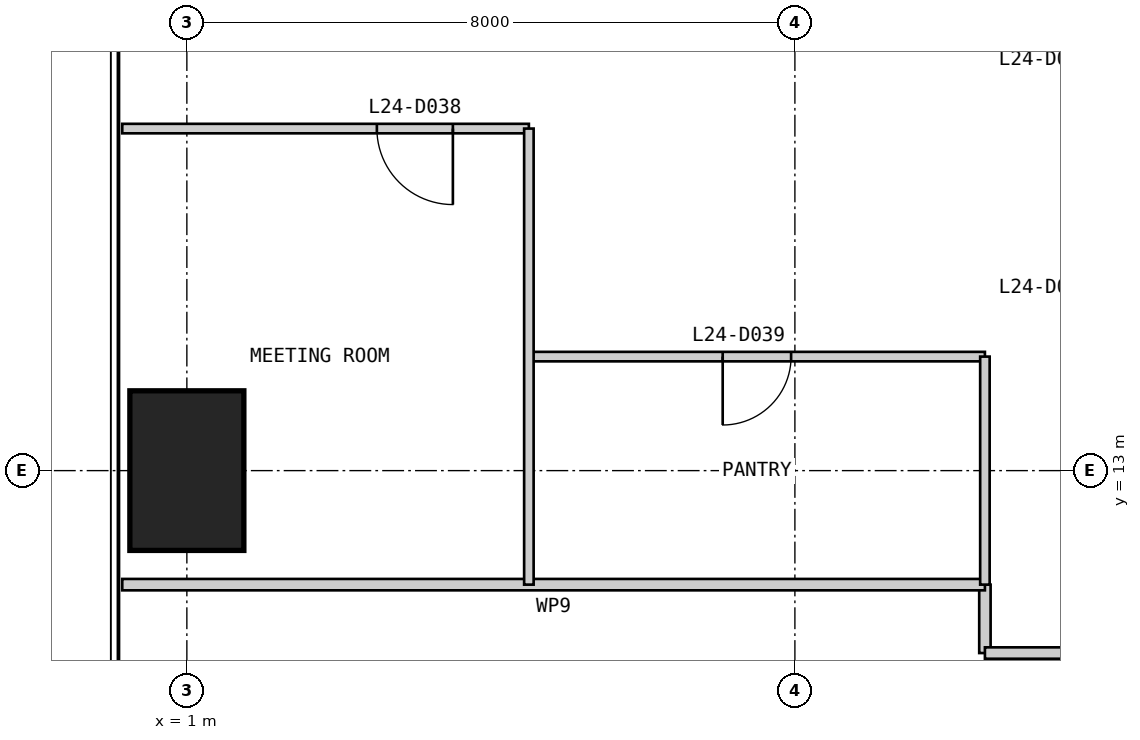
"""IFC4 building model, lengths in metres.
Left out: names, types, materials, properties, quantities, classifications, styles, units other than length and angle.
Written with IfcOpenShell. Run it as: python <this file> out.ifc"""

import sys

from ifc_helpers import new_model, si_unit, direction, frame, frame_2d, origin, origin_2d, place, context, subcontext, project, spatial, rectangle, extrude, element, fill, save


model = new_model("IFC4")
c1 = context("Model", 3, precision=1e-05, world=origin(), true_north=direction((0.0, 1.0)))
c2 = subcontext(c1, "Body", "Model", "MODEL_VIEW")
j1 = project(units=[si_unit("LENGTHUNIT", "METRE"), si_unit("PLANEANGLEUNIT", "RADIAN")], contexts=[c1])
p1 = place(None, origin())
s1 = spatial("IfcSite", under=j1, at=p1, CompositionType="ELEMENT")
p2 = place(p1, origin())
s2 = spatial("IfcBuilding", under=s1, at=p2, CompositionType="ELEMENT")
p3 = place(p2, frame((0.0, 0.0, 106.4)))
s3 = spatial("IfcBuildingStorey", under=s2, at=p3, CompositionType="ELEMENT", Elevation=106.4)
p4 = place(p3, frame((1.0, 13.0, 0.0), z_axis=(0.0, 0.0, 1.0), x_axis=(1.0, 0.0, 0.0)))
e1 = element("IfcColumn", 1, at=p4, inside=s3, PredefinedType="COLUMN", context=c2, shape_type="SweptSolid", body=[
    extrude(rectangle(XDim=1.5, YDim=2.1, at=origin_2d()), origin(), (0.0, 0.0, 1.0), 4.0),
])
p5 = place(p3, frame((11.5, 11.5, 0.0), z_axis=(0.0, 0.0, 1.0), x_axis=(0.0, -1.0, 0.0)))
e2 = element("IfcWall", 2, at=p5, inside=s3, PredefinedType="PARTITIONING", context=c2, shape_type="SweptSolid", body=[
    extrude(rectangle(XDim=0.9, YDim=0.15, at=frame_2d((0.45, 0.0))), origin(), (0.0, 0.0, 1.0), 3.85),
])
p6 = place(p3, frame((11.5, 10.6, 0.0), z_axis=(0.0, 0.0, 1.0), x_axis=(1.0, 0.0, 0.0)))
e3 = element("IfcWall", 3, at=p6, inside=s3, PredefinedType="PARTITIONING", context=c2, shape_type="SweptSolid", body=[
    extrude(rectangle(XDim=27.9, YDim=0.15, at=frame_2d((13.95, 0.0))), origin(), (0.0, 0.0, 1.0), 3.85),
])
p7 = place(p6, frame((12.25, 0.0, 0.0)))
e4 = element("IfcOpeningElement", 4, at=p7, cuts=e3, PredefinedType="OPENING", context=c2, shape_type="SweptSolid", body=[
    extrude(rectangle(XDim=1.0, YDim=2.2, at=frame_2d((0.5, 1.1))), frame((0.0, 0.085, 0.0), z_axis=(0.0, -1.0, 0.0), x_axis=(1.0, 0.0, 0.0)), (0.0, 0.0, 1.0), 0.17),
])
p8 = place(p3, frame((0.15, 11.5, 0.0), z_axis=(0.0, 0.0, 1.0), x_axis=(1.0, 0.0, 0.0)))
e5 = element("IfcWall", 5, at=p8, inside=s3, PredefinedType="PARTITIONING", context=c2, shape_type="SweptSolid", body=[
    extrude(rectangle(XDim=11.35, YDim=0.15, at=frame_2d((5.675, 0.0))), origin(), (0.0, 0.0, 1.0), 3.85),
])
p9 = place(p3, frame((0.15, 17.5, 0.0), z_axis=(0.0, 0.0, 1.0), x_axis=(1.0, 0.0, 0.0)))
e6 = element("IfcWall", 6, at=p9, inside=s3, PredefinedType="PARTITIONING", context=c2, shape_type="SweptSolid", body=[
    extrude(rectangle(XDim=5.35, YDim=0.125, at=frame_2d((2.675, 0.0))), origin(), (0.0, 0.0, 1.0), 3.85),
])
p10 = place(p9, frame((3.35, 0.0, 0.0)))
e7 = element("IfcOpeningElement", 7, at=p10, cuts=e6, PredefinedType="OPENING", context=c2, shape_type="SweptSolid", body=[
    extrude(rectangle(XDim=1.0, YDim=2.2, at=frame_2d((0.5, 1.1))), frame((0.0, 0.073, 0.0), z_axis=(0.0, -1.0, 0.0), x_axis=(1.0, 0.0, 0.0)), (0.0, 0.0, 1.0), 0.145),
])
p11 = place(p3, frame((5.5, 14.5, 0.0), z_axis=(0.0, 0.0, 1.0), x_axis=(1.0, 0.0, 0.0)))
e8 = element("IfcWall", 8, at=p11, inside=s3, PredefinedType="PARTITIONING", context=c2, shape_type="SweptSolid", body=[
    extrude(rectangle(XDim=6.0, YDim=0.125, at=frame_2d((3.0, 0.0))), origin(), (0.0, 0.0, 1.0), 3.85),
])
p12 = place(p11, frame((2.55, 0.0, 0.0)))
e9 = element("IfcOpeningElement", 9, at=p12, cuts=e8, PredefinedType="OPENING", context=c2, shape_type="SweptSolid", body=[
    extrude(rectangle(XDim=0.9, YDim=2.2, at=frame_2d((0.45, 1.1))), frame((0.0, 0.073, 0.0), z_axis=(0.0, -1.0, 0.0), x_axis=(1.0, 0.0, 0.0)), (0.0, 0.0, 1.0), 0.145),
])
p13 = place(p3, frame((5.5, 17.5, 0.0), z_axis=(0.0, 0.0, 1.0), x_axis=(0.0, -1.0, 0.0)))
e10 = element("IfcWall", 10, at=p13, inside=s3, PredefinedType="PARTITIONING", context=c2, shape_type="SweptSolid", body=[
    extrude(rectangle(XDim=6.0, YDim=0.125, at=frame_2d((3.0, 0.0))), origin(), (0.0, 0.0, 1.0), 3.85),
])
p14 = place(p3, frame((11.5, 14.5, 0.0), z_axis=(0.0, 0.0, 1.0), x_axis=(0.0, -1.0, 0.0)))
e11 = element("IfcWall", 11, at=p14, inside=s3, PredefinedType="PARTITIONING", context=c2, shape_type="SweptSolid", body=[
    extrude(rectangle(XDim=3.0, YDim=0.125, at=frame_2d((1.5, 0.0))), origin(), (0.0, 0.0, 1.0), 3.85),
])
p15 = place(p10, frame((1.0, 0.0, 0.0), z_axis=(0.0, 0.0, 1.0), x_axis=(-1.0, 0.0, 0.0)))
e12 = element("IfcDoor", 12, at=p15, inside=s3, OperationType="SINGLE_SWING_LEFT", PredefinedType="DOOR", context=c2, shape_type="SweptSolid", body=[
    extrude(rectangle(XDim=1.0, YDim=2.2, at=frame_2d((0.5, 1.1))), frame((0.0, 0.025, 0.0), z_axis=(0.0, -1.0, 0.0), x_axis=(1.0, 0.0, 0.0)), (0.0, 0.0, 1.0), 0.05),
])
fill(e7, e12)
p16 = place(p12, frame((0.9, 0.0, 0.0), z_axis=(0.0, 0.0, 1.0), x_axis=(-1.0, 0.0, 0.0)))
e13 = element("IfcDoor", 13, at=p16, inside=s3, OperationType="SINGLE_SWING_RIGHT", PredefinedType="DOOR", context=c2, shape_type="SweptSolid", body=[
    extrude(rectangle(XDim=0.9, YDim=2.2, at=frame_2d((0.45, 1.1))), frame((0.0, 0.025, 0.0), z_axis=(0.0, -1.0, 0.0), x_axis=(1.0, 0.0, 0.0)), (0.0, 0.0, 1.0), 0.05),
])
fill(e9, e13)
save(model, sys.argv[1])
